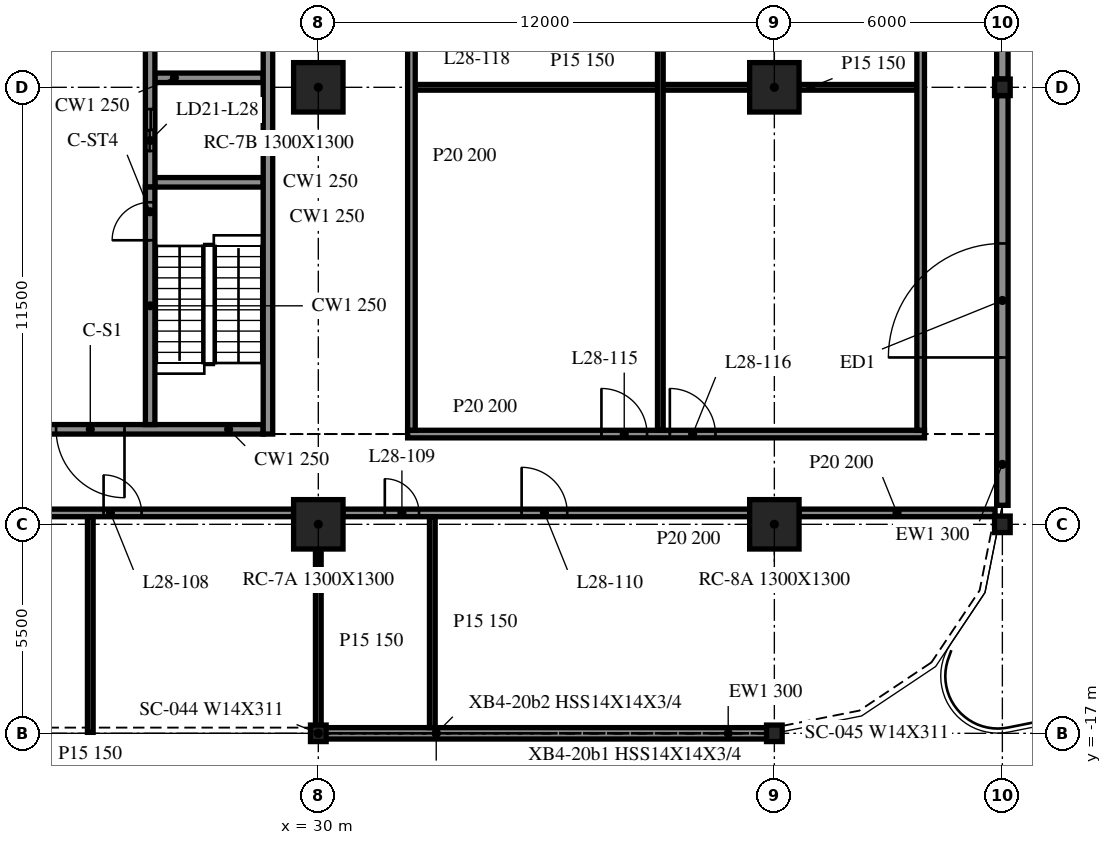
"""IFC4 building model, lengths in metres.
Left out: names, types, materials, properties, quantities, classifications, styles, units other than length and angle.
Written with IfcOpenShell. Run it as: python <this file> out.ifc"""

import sys

from ifc_helpers import new_model, si_unit, direction, frame, frame_2d, origin, origin_2d, place, context, subcontext, project, spatial, rectangle, i_section, extrude, element, fill, save


model = new_model("IFC4")
c1 = context("Model", 3, precision=1e-05, world=origin(), true_north=direction((0.0, 1.0)))
c2 = subcontext(c1, "Body", "Model", "MODEL_VIEW")
j1 = project(units=[si_unit("LENGTHUNIT", "METRE"), si_unit("PLANEANGLEUNIT", "RADIAN")], contexts=[c1])
p1 = place(None, origin())
s1 = spatial("IfcSite", under=j1, at=p1, CompositionType="ELEMENT")
p2 = place(p1, origin())
s2 = spatial("IfcBuilding", under=s1, at=p2, CompositionType="ELEMENT")
p3 = place(p2, frame((0.0, 0.0, 122.0)))
s3 = spatial("IfcBuildingStorey", under=s2, at=p3, CompositionType="ELEMENT", Elevation=122.0)
for number, where, z_axis, x_axis in (
    (1, (30.0, -11.5, -0.34), (0.0, 0.0, 1.0), (1.0, 0.0, 0.0)),
    (2, (30.0, 0.0, -0.34), (0.0, 0.0, 1.0), (1.0, 0.0, 0.0)),
    (3, (42.0, -11.5, -0.34), (0.0, 0.0, 1.0), (1.0, 0.0, 0.0)),
    (4, (42.0, 0.0, -0.34), (0.0, 0.0, 1.0), (1.0, 0.0, 0.0)),
):
    element("IfcColumn", number, at=place(p3, frame(where, z_axis=z_axis, x_axis=x_axis)), inside=s3, PredefinedType="COLUMN", context=c2, shape_type="SweptSolid", body=[
        extrude(rectangle(XDim=1.3, YDim=1.3, at=origin_2d()), origin(), (0.0, 0.0, 1.0), 4.1),
    ])
for number, where, z_axis, x_axis in (
    (5, (30.0, -17.0, -0.34), (0.0, 0.0, 1.0), (1.0, 0.0, 0.0)),
    (6, (42.0, -17.0, -0.34), (0.0, 0.0, 1.0), (1.0, 0.0, 0.0)),
    (7, (48.0, -11.5, -0.34), (0.0, 0.0, 1.0), (1.0, 0.0, 0.0)),
    (8, (48.0, 0.0, -0.34), (0.0, 0.0, 1.0), (1.0, 0.0, 0.0)),
):
    element("IfcColumn", number, at=place(p3, frame(where, z_axis=z_axis, x_axis=x_axis)), inside=s3, PredefinedType="COLUMN", context=c2, shape_type="SweptSolid", body=[
        extrude(i_section(OverallWidth=0.412, OverallDepth=0.434, WebThickness=0.036, FlangeThickness=0.057, at=origin_2d()), origin(), (0.0, 0.0, 1.0), 4.1),
    ])
p4 = place(p3, frame((30.018, -17.0, 0.0), z_axis=(0.0, 0.0, 1.0), x_axis=(1.0, 0.0, 0.0)))
e9 = element("IfcWall", 9, at=p4, inside=s3, PredefinedType="NOTDEFINED", context=c2, shape_type="SweptSolid", body=[
    extrude(rectangle(XDim=11.964, YDim=0.3, at=frame_2d((5.982, 0.0))), origin(), (0.0, 0.0, 1.0), 3.003),
])
p5 = place(p3, frame((48.0, -11.0, 0.0), z_axis=(0.0, 0.0, 1.0), x_axis=(0.0, 1.0, 0.0)))
e10 = element("IfcWall", 10, at=p5, inside=s3, PredefinedType="NOTDEFINED", context=c2, shape_type="SweptSolid", body=[
    extrude(rectangle(XDim=10.782, YDim=0.3, at=frame_2d((5.391, 0.0))), origin(), (0.0, 0.0, 1.0), 3.003),
])
p6 = place(p5, frame((3.891, 0.0, 0.0)))
e11 = element("IfcOpeningElement", 11, at=p6, cuts=e10, PredefinedType="OPENING", context=c2, shape_type="SweptSolid", body=[
    extrude(rectangle(XDim=3.0, YDim=2.4, at=frame_2d((1.5, 1.2))), frame((0.0, 0.16, 0.0), z_axis=(0.0, -1.0, 0.0), x_axis=(1.0, 0.0, 0.0)), (0.0, 0.0, 1.0), 0.32),
])
p7 = place(p3, frame((48.0, 0.218, 0.0), z_axis=(0.0, 0.0, 1.0), x_axis=(0.0, 1.0, 0.0)))
e12 = element("IfcWall", 12, at=p7, inside=s3, PredefinedType="NOTDEFINED", context=c2, shape_type="SweptSolid", body=[
    extrude(rectangle(XDim=11.064, YDim=0.3, at=frame_2d((5.532, 0.0))), origin(), (0.0, 0.0, 1.0), 3.003),
])
p8 = place(p7, frame((4.032, 0.0, 0.0)))
e13 = element("IfcOpeningElement", 13, at=p8, cuts=e12, PredefinedType="OPENING", context=c2, shape_type="SweptSolid", body=[
    extrude(rectangle(XDim=3.0, YDim=2.4, at=frame_2d((1.5, 1.2))), frame((0.0, 0.16, 0.0), z_axis=(0.0, -1.0, 0.0), x_axis=(1.0, 0.0, 0.0)), (0.0, 0.0, 1.0), 0.32),
])
p9 = place(p3, frame((28.675, -9.125, 0.0), z_axis=(0.0, 0.0, 1.0), x_axis=(0.0, 1.0, 0.0)))
e14 = element("IfcWall", 14, at=p9, inside=s3, PredefinedType="SOLIDWALL", context=c2, shape_type="SweptSolid", body=[
    extrude(rectangle(XDim=24.25, YDim=0.25, at=frame_2d((12.125, 0.0))), origin(), (0.0, 0.0, 1.0), 3.76),
])
p10 = place(p9, frame((13.075, 0.0, 0.0)))
e15 = element("IfcOpeningElement", 15, at=p10, cuts=e14, PredefinedType="OPENING", context=c2, shape_type="SweptSolid", body=[
    extrude(rectangle(XDim=0.9, YDim=2.1, at=frame_2d((0.45, 1.05))), frame((0.0, 0.135, 0.0), z_axis=(0.0, -1.0, 0.0), x_axis=(1.0, 0.0, 0.0)), (0.0, 0.0, 1.0), 0.27),
])
p11 = place(p9, frame((15.775, 0.0, 0.0)))
e16 = element("IfcOpeningElement", 16, at=p11, cuts=e14, PredefinedType="OPENING", context=c2, shape_type="SweptSolid", body=[
    extrude(rectangle(XDim=0.9, YDim=2.1, at=frame_2d((0.45, 1.05))), frame((0.0, 0.135, 0.0), z_axis=(0.0, -1.0, 0.0), x_axis=(1.0, 0.0, 0.0)), (0.0, 0.0, 1.0), 0.27),
])
p12 = place(p9, frame((19.075, 0.0, 0.0)))
e17 = element("IfcOpeningElement", 17, at=p12, cuts=e14, PredefinedType="OPENING", context=c2, shape_type="SweptSolid", body=[
    extrude(rectangle(XDim=0.9, YDim=2.1, at=frame_2d((0.45, 1.05))), frame((0.0, 0.135, 0.0), z_axis=(0.0, -1.0, 0.0), x_axis=(1.0, 0.0, 0.0)), (0.0, 0.0, 1.0), 0.27),
])
p13 = place(p9, frame((22.327, 0.0, 0.0)))
e18 = element("IfcOpeningElement", 18, at=p13, cuts=e14, PredefinedType="OPENING", context=c2, shape_type="SweptSolid", body=[
    extrude(rectangle(XDim=0.9, YDim=2.1, at=frame_2d((0.45, 1.05))), frame((0.0, 0.135, 0.0), z_axis=(0.0, -1.0, 0.0), x_axis=(1.0, 0.0, 0.0)), (0.0, 0.0, 1.0), 0.27),
])
p14 = place(p3, frame((28.55, -9.0, 0.0), z_axis=(0.0, 0.0, 1.0), x_axis=(-1.0, 0.0, 0.0)))
e19 = element("IfcWall", 19, at=p14, inside=s3, PredefinedType="SOLIDWALL", context=c2, shape_type="SweptSolid", body=[
    extrude(rectangle(XDim=9.1, YDim=0.25, at=frame_2d((4.55, 0.0))), origin(), (0.0, 0.0, 1.0), 3.76),
])
p15 = place(p14, frame((3.65, 0.0, 0.0)))
e20 = element("IfcOpeningElement", 20, at=p15, cuts=e19, PredefinedType="OPENING", context=c2, shape_type="SweptSolid", body=[
    extrude(rectangle(XDim=1.8, YDim=2.1, at=frame_2d((0.9, 1.05))), frame((0.0, 0.135, 0.0), z_axis=(0.0, -1.0, 0.0), x_axis=(1.0, 0.0, 0.0)), (0.0, 0.0, 1.0), 0.27),
])
p16 = place(p3, frame((25.575, -8.875, 0.0), z_axis=(0.0, 0.0, 1.0), x_axis=(0.0, 1.0, 0.0)))
e21 = element("IfcWall", 21, at=p16, inside=s3, PredefinedType="SOLIDWALL", context=c2, shape_type="SweptSolid", body=[
    extrude(rectangle(XDim=6.25, YDim=0.25, at=frame_2d((3.125, 0.0))), origin(), (0.0, 0.0, 1.0), 3.76),
])
p17 = place(p16, frame((4.85, 0.0, 0.0)))
e22 = element("IfcOpeningElement", 22, at=p17, cuts=e21, PredefinedType="OPENING", context=c2, shape_type="SweptSolid", body=[
    extrude(rectangle(XDim=1.0, YDim=2.1, at=frame_2d((0.5, 1.05))), frame((0.0, 0.135, 0.0), z_axis=(0.0, -1.0, 0.0), x_axis=(1.0, 0.0, 0.0)), (0.0, 0.0, 1.0), 0.27),
])
p18 = place(p3, frame((25.575, 14.875, 0.0), z_axis=(0.0, 0.0, 1.0), x_axis=(0.0, -1.0, 0.0)))
e23 = element("IfcWall", 23, at=p18, inside=s3, PredefinedType="SOLIDWALL", context=c2, shape_type="SweptSolid", body=[
    extrude(rectangle(XDim=17.5, YDim=0.25, at=frame_2d((8.75, 0.0))), origin(), (0.0, 0.0, 1.0), 3.76),
])
p19 = place(p18, frame((15.45, 0.0, 0.0)))
e24 = element("IfcOpeningElement", 24, at=p19, cuts=e23, PredefinedType="OPENING", context=c2, shape_type="SweptSolid", body=[
    extrude(rectangle(XDim=1.1, YDim=2.1, at=frame_2d((0.55, 1.05))), frame((0.0, 0.135, 0.0), z_axis=(0.0, -1.0, 0.0), x_axis=(1.0, 0.0, 0.0)), (0.0, 0.0, 1.0), 0.27),
])
p20 = place(p18, frame((12.8, 0.0, 0.0)))
e25 = element("IfcOpeningElement", 25, at=p20, cuts=e23, PredefinedType="OPENING", context=c2, shape_type="SweptSolid", body=[
    extrude(rectangle(XDim=0.9, YDim=2.1, at=frame_2d((0.45, 1.05))), frame((0.0, 0.135, 0.0), z_axis=(0.0, -1.0, 0.0), x_axis=(1.0, 0.0, 0.0)), (0.0, 0.0, 1.0), 0.27),
])
for number, where, z_axis, x_axis in (
    (26, (25.7, -2.5, 0.0), (0.0, 0.0, 1.0), (1.0, 0.0, 0.0)),
    (27, (25.7, 0.25, 0.0), (0.0, 0.0, 1.0), (1.0, 0.0, 0.0)),
):
    element("IfcWall", number, at=place(p3, frame(where, z_axis=z_axis, x_axis=x_axis)), inside=s3, PredefinedType="SOLIDWALL", context=c2, shape_type="SweptSolid", body=[
        extrude(rectangle(XDim=2.85, YDim=0.25, at=frame_2d((1.425, 0.0))), origin(), (0.0, 0.0, 1.0), 3.76),
    ])
p21 = place(p3, frame((18.65, -11.2, 0.0), z_axis=(0.0, 0.0, 1.0), x_axis=(1.0, 0.0, 0.0)))
e28 = element("IfcWall", 28, at=p21, inside=s3, PredefinedType="PARTITIONING", context=c2, shape_type="SweptSolid", body=[
    extrude(rectangle(XDim=10.7, YDim=0.2, at=frame_2d((5.35, 0.0))), origin(), (0.0, 0.0, 1.0), 3.76),
])
p22 = place(p21, frame((5.7, 0.0, 0.0)))
e29 = element("IfcOpeningElement", 29, at=p22, cuts=e28, PredefinedType="OPENING", context=c2, shape_type="SweptSolid", body=[
    extrude(rectangle(XDim=1.0, YDim=2.1, at=frame_2d((0.5, 1.05))), frame((0.0, 0.11, 0.0), z_axis=(0.0, -1.0, 0.0), x_axis=(1.0, 0.0, 0.0)), (0.0, 0.0, 1.0), 0.22),
])
p23 = place(p3, frame((30.65, -11.2, 0.0), z_axis=(0.0, 0.0, 1.0), x_axis=(1.0, 0.0, 0.0)))
e30 = element("IfcWall", 30, at=p23, inside=s3, PredefinedType="PARTITIONING", context=c2, shape_type="SweptSolid", body=[
    extrude(rectangle(XDim=10.7, YDim=0.2, at=frame_2d((5.35, 0.0))), origin(), (0.0, 0.0, 1.0), 3.76),
])
p24 = place(p23, frame((1.1, 0.0, 0.0)))
e31 = element("IfcOpeningElement", 31, at=p24, cuts=e30, PredefinedType="OPENING", context=c2, shape_type="SweptSolid", body=[
    extrude(rectangle(XDim=0.9, YDim=2.1, at=frame_2d((0.45, 1.05))), frame((0.0, 0.11, 0.0), z_axis=(0.0, -1.0, 0.0), x_axis=(1.0, 0.0, 0.0)), (0.0, 0.0, 1.0), 0.22),
])
p25 = place(p23, frame((4.7, 0.0, 0.0)))
e32 = element("IfcOpeningElement", 32, at=p25, cuts=e30, PredefinedType="OPENING", context=c2, shape_type="SweptSolid", body=[
    extrude(rectangle(XDim=1.2, YDim=2.1, at=frame_2d((0.6, 1.05))), frame((0.0, 0.11, 0.0), z_axis=(0.0, -1.0, 0.0), x_axis=(1.0, 0.0, 0.0)), (0.0, 0.0, 1.0), 0.22),
])
p26 = place(p3, frame((42.65, -11.2, 0.0), z_axis=(0.0, 0.0, 1.0), x_axis=(1.0, 0.0, 0.0)))
e33 = element("IfcWall", 33, at=p26, inside=s3, PredefinedType="PARTITIONING", context=c2, shape_type="SweptSolid", body=[
    extrude(rectangle(XDim=5.157, YDim=0.2, at=frame_2d((2.579, 0.0))), origin(), (0.0, 0.0, 1.0), 3.76),
])
p27 = place(p3, frame((32.35, -9.125, 0.0), z_axis=(0.0, 0.0, 1.0), x_axis=(1.0, 0.0, 0.0)))
e34 = element("IfcWall", 34, at=p27, inside=s3, PredefinedType="PARTITIONING", context=c2, shape_type="SweptSolid", body=[
    extrude(rectangle(XDim=13.6, YDim=0.2, at=frame_2d((6.8, 0.0))), origin(), (0.0, 0.0, 1.0), 3.76),
])
p28 = place(p27, frame((5.1, 0.0, 0.0)))
e35 = element("IfcOpeningElement", 35, at=p28, cuts=e34, PredefinedType="OPENING", context=c2, shape_type="SweptSolid", body=[
    extrude(rectangle(XDim=1.2, YDim=2.1, at=frame_2d((0.6, 1.05))), frame((0.0, 0.11, 0.0), z_axis=(0.0, -1.0, 0.0), x_axis=(1.0, 0.0, 0.0)), (0.0, 0.0, 1.0), 0.22),
])
p29 = place(p27, frame((6.9, 0.0, 0.0)))
e36 = element("IfcOpeningElement", 36, at=p29, cuts=e34, PredefinedType="OPENING", context=c2, shape_type="SweptSolid", body=[
    extrude(rectangle(XDim=1.2, YDim=2.1, at=frame_2d((0.6, 1.05))), frame((0.0, 0.11, 0.0), z_axis=(0.0, -1.0, 0.0), x_axis=(1.0, 0.0, 0.0)), (0.0, 0.0, 1.0), 0.22),
])
p30 = place(p3, frame((32.55, 0.0, 0.0), z_axis=(0.0, 0.0, 1.0), x_axis=(1.0, 0.0, 0.0)))
e37 = element("IfcWall", 37, at=p30, inside=s3, PredefinedType="PARTITIONING", context=c2, shape_type="SweptSolid", body=[
    extrude(rectangle(XDim=8.8, YDim=0.15, at=frame_2d((4.4, 0.0))), origin(), (0.0, 0.0, 1.0), 3.76),
])
p31 = place(p3, frame((42.65, 0.0, 0.0), z_axis=(0.0, 0.0, 1.0), x_axis=(1.0, 0.0, 0.0)))
e38 = element("IfcWall", 38, at=p31, inside=s3, PredefinedType="PARTITIONING", context=c2, shape_type="SweptSolid", body=[
    extrude(rectangle(XDim=3.1, YDim=0.15, at=frame_2d((1.55, 0.0))), origin(), (0.0, 0.0, 1.0), 3.76),
])
p32 = place(p3, frame((24.0, -16.975, 0.0), z_axis=(0.0, 0.0, 1.0), x_axis=(0.0, 1.0, 0.0)))
e39 = element("IfcWall", 39, at=p32, inside=s3, PredefinedType="PARTITIONING", context=c2, shape_type="SweptSolid", body=[
    extrude(rectangle(XDim=5.675, YDim=0.15, at=frame_2d((2.837, 0.0))), origin(), (0.0, 0.0, 1.0), 3.76),
])
p33 = place(p3, frame((30.0, -16.975, 0.0), z_axis=(0.0, 0.0, 1.0), x_axis=(0.0, 1.0, 0.0)))
e40 = element("IfcWall", 40, at=p33, inside=s3, PredefinedType="PARTITIONING", context=c2, shape_type="SweptSolid", body=[
    extrude(rectangle(XDim=4.825, YDim=0.15, at=frame_2d((2.413, 0.0))), origin(), (0.0, 0.0, 1.0), 3.76),
])
p34 = place(p3, frame((32.45, -9.025, 0.0), z_axis=(0.0, 0.0, 1.0), x_axis=(0.0, 1.0, 0.0)))
e41 = element("IfcWall", 41, at=p34, inside=s3, PredefinedType="PARTITIONING", context=c2, shape_type="SweptSolid", body=[
    extrude(rectangle(XDim=24.05, YDim=0.2, at=frame_2d((12.025, 0.0))), origin(), (0.0, 0.0, 1.0), 3.76),
])
p35 = place(p34, frame((11.5, 0.0, 0.0)))
e42 = element("IfcOpeningElement", 42, at=p35, cuts=e41, PredefinedType="OPENING", context=c2, shape_type="SweptSolid", body=[
    extrude(rectangle(XDim=1.2, YDim=2.1, at=frame_2d((0.6, 1.05))), frame((0.0, 0.11, 0.0), z_axis=(0.0, -1.0, 0.0), x_axis=(1.0, 0.0, 0.0)), (0.0, 0.0, 1.0), 0.22),
])
p36 = place(p3, frame((33.0, -16.85, 0.0), z_axis=(0.0, 0.0, 1.0), x_axis=(0.0, 1.0, 0.0)))
e43 = element("IfcWall", 43, at=p36, inside=s3, PredefinedType="PARTITIONING", context=c2, shape_type="SweptSolid", body=[
    extrude(rectangle(XDim=5.55, YDim=0.15, at=frame_2d((2.775, 0.0))), origin(), (0.0, 0.0, 1.0), 3.76),
])
p37 = place(p3, frame((39.0, -9.025, 0.0), z_axis=(0.0, 0.0, 1.0), x_axis=(0.0, 1.0, 0.0)))
e44 = element("IfcWall", 44, at=p37, inside=s3, PredefinedType="PARTITIONING", context=c2, shape_type="SweptSolid", body=[
    extrude(rectangle(XDim=24.05, YDim=0.15, at=frame_2d((12.025, 0.0))), origin(), (0.0, 0.0, 1.0), 3.76),
])
p38 = place(p3, frame((45.85, -9.025, 0.0), z_axis=(0.0, 0.0, 1.0), x_axis=(0.0, 1.0, 0.0)))
e45 = element("IfcWall", 45, at=p38, inside=s3, PredefinedType="PARTITIONING", context=c2, shape_type="SweptSolid", body=[
    extrude(rectangle(XDim=24.05, YDim=0.2, at=frame_2d((12.025, 0.0))), origin(), (0.0, 0.0, 1.0), 3.76),
])
p39 = place(p38, frame((11.5, 0.0, 0.0)))
e46 = element("IfcOpeningElement", 46, at=p39, cuts=e45, PredefinedType="OPENING", context=c2, shape_type="SweptSolid", body=[
    extrude(rectangle(XDim=1.2, YDim=2.1, at=frame_2d((0.6, 1.05))), frame((0.0, 0.11, 0.0), z_axis=(0.0, -1.0, 0.0), x_axis=(1.0, 0.0, 0.0)), (0.0, 0.0, 1.0), 0.22),
])
p40 = place(p6, origin())
e47 = element("IfcDoor", 47, at=p40, inside=s3, OperationType="SINGLE_SWING_LEFT", PredefinedType="DOOR", context=c2, shape_type="SweptSolid", body=[
    extrude(rectangle(XDim=3.0, YDim=2.4, at=frame_2d((1.5, 1.2))), frame((0.0, 0.025, 0.0), z_axis=(0.0, -1.0, 0.0), x_axis=(1.0, 0.0, 0.0)), (0.0, 0.0, 1.0), 0.05),
])
fill(e11, e47)
p41 = place(p15, origin())
e48 = element("IfcDoor", 48, at=p41, inside=s3, OperationType="DOUBLE_DOOR_SINGLE_SWING", PredefinedType="DOOR", context=c2, shape_type="SweptSolid", body=[
    extrude(rectangle(XDim=1.8, YDim=2.1, at=frame_2d((0.9, 1.05))), frame((0.0, 0.025, 0.0), z_axis=(0.0, -1.0, 0.0), x_axis=(1.0, 0.0, 0.0)), (0.0, 0.0, 1.0), 0.05),
])
fill(e20, e48)
p42 = place(p19, origin())
e49 = element("IfcDoor", 49, at=p42, inside=s3, OperationType="DOUBLE_DOOR_SLIDING", PredefinedType="DOOR", context=c2, shape_type="SweptSolid", body=[
    extrude(rectangle(XDim=1.1, YDim=2.1, at=frame_2d((0.55, 1.05))), frame((0.0, 0.025, 0.0), z_axis=(0.0, -1.0, 0.0), x_axis=(1.0, 0.0, 0.0)), (0.0, 0.0, 1.0), 0.05),
])
fill(e24, e49)
p43 = place(p17, origin())
e50 = element("IfcDoor", 50, at=p43, inside=s3, OperationType="SINGLE_SWING_RIGHT", PredefinedType="DOOR", context=c2, shape_type="SweptSolid", body=[
    extrude(rectangle(XDim=1.0, YDim=2.1, at=frame_2d((0.5, 1.05))), frame((0.0, 0.025, 0.0), z_axis=(0.0, -1.0, 0.0), x_axis=(1.0, 0.0, 0.0)), (0.0, 0.0, 1.0), 0.05),
])
fill(e22, e50)
p44 = place(p22, origin())
e51 = element("IfcDoor", 51, at=p44, inside=s3, OperationType="SINGLE_SWING_LEFT", PredefinedType="DOOR", context=c2, shape_type="SweptSolid", body=[
    extrude(rectangle(XDim=1.0, YDim=2.1, at=frame_2d((0.5, 1.05))), frame((0.0, 0.025, 0.0), z_axis=(0.0, -1.0, 0.0), x_axis=(1.0, 0.0, 0.0)), (0.0, 0.0, 1.0), 0.05),
])
fill(e29, e51)
p45 = place(p24, origin())
e52 = element("IfcDoor", 52, at=p45, inside=s3, OperationType="SINGLE_SWING_RIGHT", PredefinedType="DOOR", context=c2, shape_type="SweptSolid", body=[
    extrude(rectangle(XDim=0.9, YDim=2.1, at=frame_2d((0.45, 1.05))), frame((0.0, 0.025, 0.0), z_axis=(0.0, -1.0, 0.0), x_axis=(1.0, 0.0, 0.0)), (0.0, 0.0, 1.0), 0.05),
])
fill(e31, e52)
p46 = place(p25, origin())
e53 = element("IfcDoor", 53, at=p46, inside=s3, OperationType="SINGLE_SWING_RIGHT", PredefinedType="DOOR", context=c2, shape_type="SweptSolid", body=[
    extrude(rectangle(XDim=1.2, YDim=2.1, at=frame_2d((0.6, 1.05))), frame((0.0, 0.025, 0.0), z_axis=(0.0, -1.0, 0.0), x_axis=(1.0, 0.0, 0.0)), (0.0, 0.0, 1.0), 0.05),
])
fill(e32, e53)
p47 = place(p28, origin())
e54 = element("IfcDoor", 54, at=p47, inside=s3, OperationType="SINGLE_SWING_LEFT", PredefinedType="DOOR", context=c2, shape_type="SweptSolid", body=[
    extrude(rectangle(XDim=1.2, YDim=2.1, at=frame_2d((0.6, 1.05))), frame((0.0, 0.025, 0.0), z_axis=(0.0, -1.0, 0.0), x_axis=(1.0, 0.0, 0.0)), (0.0, 0.0, 1.0), 0.05),
])
fill(e35, e54)
p48 = place(p29, origin())
e55 = element("IfcDoor", 55, at=p48, inside=s3, OperationType="SINGLE_SWING_RIGHT", PredefinedType="DOOR", context=c2, shape_type="SweptSolid", body=[
    extrude(rectangle(XDim=1.2, YDim=2.1, at=frame_2d((0.6, 1.05))), frame((0.0, 0.025, 0.0), z_axis=(0.0, -1.0, 0.0), x_axis=(1.0, 0.0, 0.0)), (0.0, 0.0, 1.0), 0.05),
])
fill(e36, e55)
save(model, sys.argv[1])
